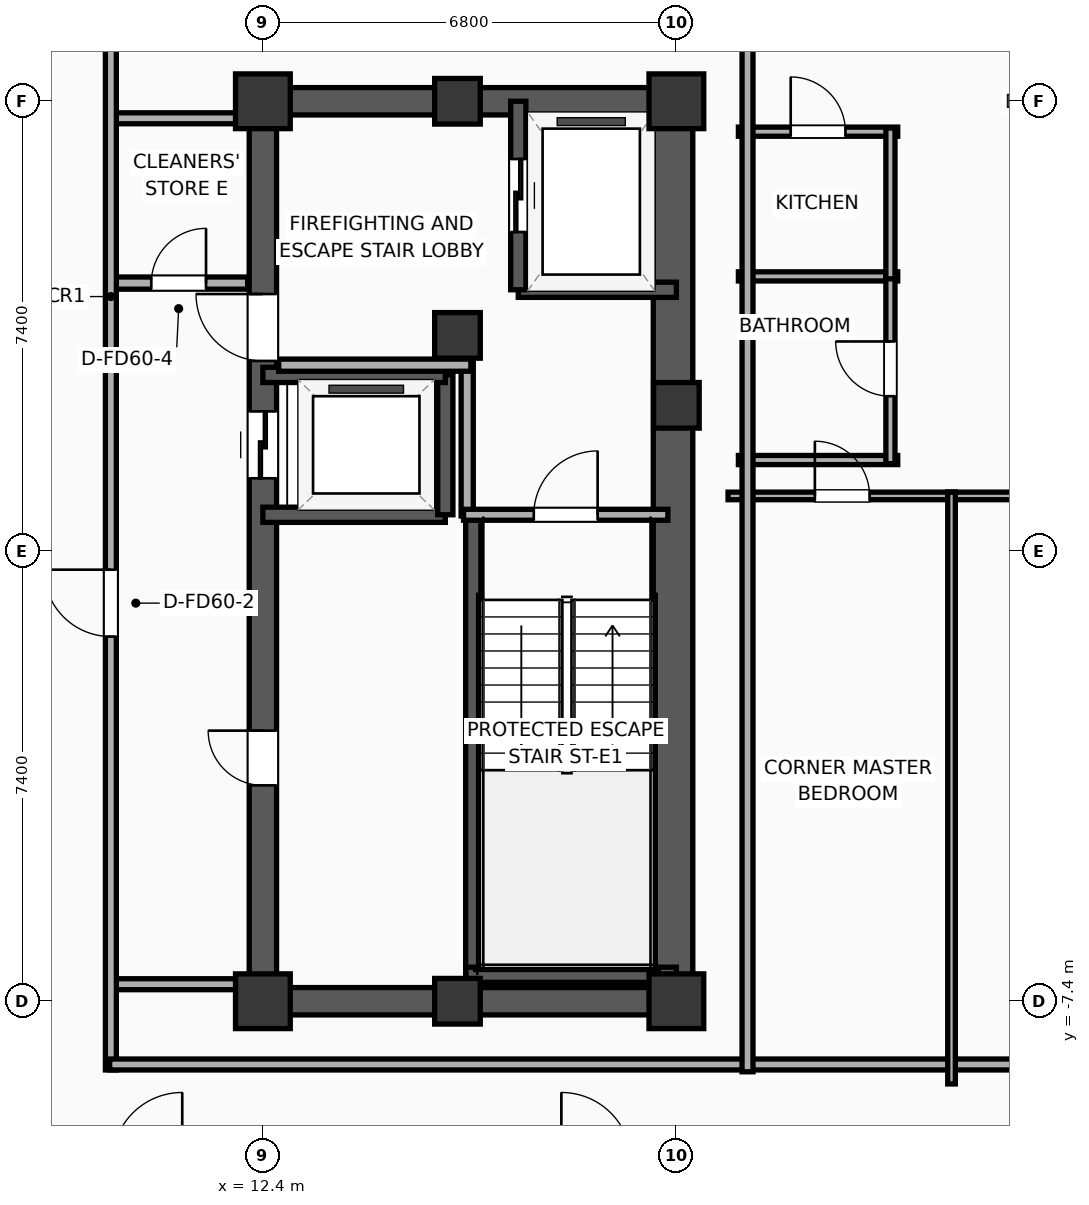
"""IFC4 building model, lengths in metres.
Left out: names, types, materials, properties, quantities, classifications, styles, units other than length and angle.
Written with IfcOpenShell. Run it as: python <this file> out.ifc"""

import sys

from ifc_helpers import new_model, si_unit, direction, frame, frame_2d, origin, origin_2d, place, context, subcontext, project, spatial, rectangle, extrude, element, fill, save


model = new_model("IFC4")
c1 = context("Model", 3, precision=1e-05, world=origin(), true_north=direction((0.0, 1.0)))
c2 = subcontext(c1, "Body", "Model", "MODEL_VIEW")
j1 = project(units=[si_unit("LENGTHUNIT", "METRE"), si_unit("PLANEANGLEUNIT", "RADIAN")], contexts=[c1])
p1 = place(None, origin())
s1 = spatial("IfcSite", under=j1, at=p1, CompositionType="ELEMENT")
p2 = place(p1, origin())
s2 = spatial("IfcBuilding", under=s1, at=p2, CompositionType="ELEMENT")
p3 = place(p2, frame((0.0, 0.0, 211.9)))
s3 = spatial("IfcBuildingStorey", under=s2, at=p3, CompositionType="ELEMENT", Elevation=211.9)
p4 = place(p3, frame((12.4, -7.4, 0.0), z_axis=(0.0, 0.0, 1.0), x_axis=(1.0, 0.0, 0.0)))
e1 = element("IfcColumn", 1, at=p4, inside=s3, PredefinedType="COLUMN", context=c2, shape_type="SweptSolid", body=[
    extrude(rectangle(XDim=0.9, YDim=0.9, at=origin_2d()), origin(), (0.0, 0.0, 1.0), 3.9),
])
p5 = place(p3, frame((15.6, 3.55, 0.0), z_axis=(0.0, 0.0, 1.0), x_axis=(1.0, 0.0, 0.0)))
e2 = element("IfcColumn", 2, at=p5, inside=s3, PredefinedType="COLUMN", context=c2, shape_type="SweptSolid", body=[
    extrude(rectangle(XDim=0.75, YDim=0.75, at=origin_2d()), origin(), (0.0, 0.0, 1.0), 3.9),
])
p6 = place(p3, frame((12.4, 7.4, 0.0), z_axis=(0.0, 0.0, 1.0), x_axis=(1.0, 0.0, 0.0)))
e3 = element("IfcColumn", 3, at=p6, inside=s3, PredefinedType="COLUMN", context=c2, shape_type="SweptSolid", body=[
    extrude(rectangle(XDim=0.9, YDim=0.9, at=origin_2d()), origin(), (0.0, 0.0, 1.0), 3.9),
])
for number, where, z_axis, x_axis in (
    (4, (15.6, -7.4, 0.0), (0.0, 0.0, 1.0), (1.0, 0.0, 0.0)),
    (5, (15.6, 7.4, 0.0), (0.0, 0.0, 1.0), (1.0, 0.0, 0.0)),
):
    element("IfcColumn", number, at=place(p3, frame(where, z_axis=z_axis, x_axis=x_axis)), inside=s3, PredefinedType="COLUMN", context=c2, shape_type="SweptSolid", body=[
        extrude(rectangle(XDim=0.75, YDim=0.75, at=origin_2d()), origin(), (0.0, 0.0, 1.0), 3.9),
    ])
p7 = place(p3, frame((19.2, -7.4, 0.0), z_axis=(0.0, 0.0, 1.0), x_axis=(1.0, 0.0, 0.0)))
e6 = element("IfcColumn", 6, at=p7, inside=s3, PredefinedType="COLUMN", context=c2, shape_type="SweptSolid", body=[
    extrude(rectangle(XDim=0.9, YDim=0.9, at=origin_2d()), origin(), (0.0, 0.0, 1.0), 3.9),
])
p8 = place(p3, frame((19.2, 2.4, 0.0), z_axis=(0.0, 0.0, 1.0), x_axis=(1.0, 0.0, 0.0)))
e7 = element("IfcColumn", 7, at=p8, inside=s3, PredefinedType="COLUMN", context=c2, shape_type="SweptSolid", body=[
    extrude(rectangle(XDim=0.75, YDim=0.75, at=origin_2d()), origin(), (0.0, 0.0, 1.0), 3.9),
])
p9 = place(p3, frame((19.2, 7.4, 0.0), z_axis=(0.0, 0.0, 1.0), x_axis=(1.0, 0.0, 0.0)))
e8 = element("IfcColumn", 8, at=p9, inside=s3, PredefinedType="COLUMN", context=c2, shape_type="SweptSolid", body=[
    extrude(rectangle(XDim=0.9, YDim=0.9, at=origin_2d()), origin(), (0.0, 0.0, 1.0), 3.9),
])
for number, where, z_axis, x_axis in (
    (9, (12.175, -7.4, 0.0), (0.0, 0.0, 1.0), (1.0, 0.0, 0.0)),
    (10, (12.175, 7.4, 0.0), (0.0, 0.0, 1.0), (1.0, 0.0, 0.0)),
):
    element("IfcWall", number, at=place(p3, frame(where, z_axis=z_axis, x_axis=x_axis)), inside=s3, PredefinedType="SHEAR", context=c2, shape_type="SweptSolid", body=[
        extrude(rectangle(XDim=7.25, YDim=0.45, at=frame_2d((3.625, 0.0))), origin(), (0.0, 0.0, 1.0), 3.65),
    ])
p10 = place(p3, frame((12.4, -7.4, 0.0), z_axis=(0.0, 0.0, 1.0), x_axis=(0.0, 1.0, 0.0)))
e11 = element("IfcWall", 11, at=p10, inside=s3, PredefinedType="SHEAR", context=c2, shape_type="SweptSolid", body=[
    extrude(rectangle(XDim=14.8, YDim=0.45, at=frame_2d((7.4, 0.0))), origin(), (0.0, 0.0, 1.0), 3.65),
])
p11 = place(p10, frame((8.6, 0.0, 0.0)))
e12 = element("IfcOpeningElement", 12, at=p11, cuts=e11, PredefinedType="OPENING", context=c2, shape_type="SweptSolid", body=[
    extrude(rectangle(XDim=1.1, YDim=2.05, at=frame_2d((0.55, 1.025))), frame((0.0, 0.235, 0.0), z_axis=(0.0, -1.0, 0.0), x_axis=(1.0, 0.0, 0.0)), (0.0, 0.0, 1.0), 0.47),
])
p12 = place(p10, frame((10.53, 0.0, 0.0)))
e13 = element("IfcOpeningElement", 13, at=p12, cuts=e11, PredefinedType="OPENING", context=c2, shape_type="SweptSolid", body=[
    extrude(rectangle(XDim=1.1, YDim=2.05, at=frame_2d((0.55, 1.025))), frame((0.0, 0.235, 0.0), z_axis=(0.0, -1.0, 0.0), x_axis=(1.0, 0.0, 0.0)), (0.0, 0.0, 1.0), 0.47),
])
p13 = place(p10, frame((3.55, 0.0, 0.0)))
e14 = element("IfcOpeningElement", 14, at=p13, cuts=e11, PredefinedType="OPENING", context=c2, shape_type="SweptSolid", body=[
    extrude(rectangle(XDim=0.9, YDim=2.05, at=frame_2d((0.45, 1.025))), frame((0.0, 0.235, 0.0), z_axis=(0.0, -1.0, 0.0), x_axis=(1.0, 0.0, 0.0)), (0.0, 0.0, 1.0), 0.47),
])
p14 = place(p3, frame((19.145, -7.4, 0.0), z_axis=(0.0, 0.0, 1.0), x_axis=(0.0, 1.0, 0.0)))
e15 = element("IfcWall", 15, at=p14, inside=s3, PredefinedType="SHEAR", context=c2, shape_type="SweptSolid", body=[
    extrude(rectangle(XDim=14.8, YDim=0.65, at=frame_2d((7.4, 0.0))), origin(), (0.0, 0.0, 1.0), 3.65),
])
p15 = place(p3, frame((15.86, -7.085, 0.0), z_axis=(0.0, 0.0, 1.0), x_axis=(0.0, 1.0, 0.0)))
e16 = element("IfcWall", 16, at=p15, inside=s3, PredefinedType="SOLIDWALL", context=c2, shape_type="SweptSolid", body=[
    extrude(rectangle(XDim=7.685, YDim=0.25, at=frame_2d((3.843, 0.0))), origin(), (0.0, 0.0, 1.0), 3.65),
])
p16 = place(p3, frame((15.74, -6.965, 0.0), z_axis=(0.0, 0.0, 1.0), x_axis=(1.0, 0.0, 0.0)))
e17 = element("IfcWall", 17, at=p16, inside=s3, PredefinedType="SOLIDWALL", context=c2, shape_type="SweptSolid", body=[
    extrude(rectangle(XDim=3.46, YDim=0.25, at=frame_2d((1.73, 0.0))), origin(), (0.0, 0.0, 1.0), 3.65),
])
p17 = place(p3, frame((16.6, 4.3, 0.0), z_axis=(0.0, 0.0, 1.0), x_axis=(1.0, 0.0, 0.0)))
e18 = element("IfcWall", 18, at=p17, inside=s3, PredefinedType="SOLIDWALL", context=c2, shape_type="SweptSolid", body=[
    extrude(rectangle(XDim=2.6, YDim=0.25, at=frame_2d((1.3, 0.0))), origin(), (0.0, 0.0, 1.0), 3.65),
])
p18 = place(p3, frame((16.6, 7.4, 0.0), z_axis=(0.0, 0.0, 1.0), x_axis=(0.0, -1.0, 0.0)))
e19 = element("IfcWall", 19, at=p18, inside=s3, PredefinedType="SOLIDWALL", context=c2, shape_type="SweptSolid", body=[
    extrude(rectangle(XDim=3.1, YDim=0.25, at=frame_2d((1.55, 0.0))), origin(), (0.0, 0.0, 1.0), 3.65),
])
p19 = place(p18, frame((0.95, 0.0, 0.0)))
e20 = element("IfcOpeningElement", 20, at=p19, cuts=e19, PredefinedType="OPENING", context=c2, shape_type="SweptSolid", body=[
    extrude(rectangle(XDim=1.2, YDim=2.05, at=frame_2d((0.6, 1.025))), frame((0.0, 0.135, 0.0), z_axis=(0.0, -1.0, 0.0), x_axis=(1.0, 0.0, 0.0)), (0.0, 0.0, 1.0), 0.27),
])
p20 = place(p3, frame((12.4, 0.6, 0.0), z_axis=(0.0, 0.0, 1.0), x_axis=(1.0, 0.0, 0.0)))
e21 = element("IfcWall", 21, at=p20, inside=s3, PredefinedType="SOLIDWALL", context=c2, shape_type="SweptSolid", body=[
    extrude(rectangle(XDim=3.0, YDim=0.25, at=frame_2d((1.5, 0.0))), origin(), (0.0, 0.0, 1.0), 3.65),
])
p21 = place(p3, frame((15.4, 0.6, 0.0), z_axis=(0.0, 0.0, 1.0), x_axis=(0.0, 1.0, 0.0)))
e22 = element("IfcWall", 22, at=p21, inside=s3, PredefinedType="SOLIDWALL", context=c2, shape_type="SweptSolid", body=[
    extrude(rectangle(XDim=2.3, YDim=0.25, at=frame_2d((1.15, 0.0))), origin(), (0.0, 0.0, 1.0), 3.65),
])
p22 = place(p3, frame((15.4, 2.9, 0.0), z_axis=(0.0, 0.0, 1.0), x_axis=(-1.0, 0.0, 0.0)))
e23 = element("IfcWall", 23, at=p22, inside=s3, PredefinedType="SOLIDWALL", context=c2, shape_type="SweptSolid", body=[
    extrude(rectangle(XDim=3.0, YDim=0.25, at=frame_2d((1.5, 0.0))), origin(), (0.0, 0.0, 1.0), 3.65),
])
p23 = place(p3, frame((15.76, 0.58, 0.0), z_axis=(0.0, 0.0, 1.0), x_axis=(0.0, 1.0, 0.0)))
e24 = element("IfcWall", 24, at=p23, inside=s3, PredefinedType="PARTITIONING", context=c2, shape_type="SweptSolid", body=[
    extrude(rectangle(XDim=2.52, YDim=0.2, at=frame_2d((1.26, 0.0))), origin(), (0.0, 0.0, 1.0), 3.65),
])
p24 = place(p3, frame((12.66, 3.06, 0.0), z_axis=(0.0, 0.0, 1.0), x_axis=(1.0, 0.0, 0.0)))
e25 = element("IfcWall", 25, at=p24, inside=s3, PredefinedType="PARTITIONING", context=c2, shape_type="SweptSolid", body=[
    extrude(rectangle(XDim=3.16, YDim=0.2, at=frame_2d((1.58, 0.0))), origin(), (0.0, 0.0, 1.0), 3.65),
])
p25 = place(p3, frame((15.7, 0.6, 0.0), z_axis=(0.0, 0.0, 1.0), x_axis=(1.0, 0.0, 0.0)))
e26 = element("IfcWall", 26, at=p25, inside=s3, PredefinedType="PARTITIONING", context=c2, shape_type="SweptSolid", body=[
    extrude(rectangle(XDim=3.36, YDim=0.18, at=frame_2d((1.68, 0.0))), origin(), (0.0, 0.0, 1.0), 3.65),
])
p26 = place(p25, frame((1.155, 0.0, 0.0)))
e27 = element("IfcOpeningElement", 27, at=p26, cuts=e26, PredefinedType="OPENING", context=c2, shape_type="SweptSolid", body=[
    extrude(rectangle(XDim=1.05, YDim=2.05, at=frame_2d((0.525, 1.025))), frame((0.0, 0.1, 0.0), z_axis=(0.0, -1.0, 0.0), x_axis=(1.0, 0.0, 0.0)), (0.0, 0.0, 1.0), 0.2),
])
p27 = place(p3, frame((9.88, 4.41, 0.0), z_axis=(0.0, 0.0, 1.0), x_axis=(1.0, 0.0, 0.0)))
e28 = element("IfcWall", 28, at=p27, inside=s3, PredefinedType="PARTITIONING", context=c2, shape_type="SweptSolid", body=[
    extrude(rectangle(XDim=2.27, YDim=0.2, at=frame_2d((1.135, 0.0))), origin(), (0.0, 0.0, 1.0), 3.65),
])
p28 = place(p27, frame((0.685, 0.0, 0.0)))
e29 = element("IfcOpeningElement", 29, at=p28, cuts=e28, PredefinedType="OPENING", context=c2, shape_type="SweptSolid", body=[
    extrude(rectangle(XDim=0.9, YDim=2.05, at=frame_2d((0.45, 1.025))), frame((0.0, 0.11, 0.0), z_axis=(0.0, -1.0, 0.0), x_axis=(1.0, 0.0, 0.0)), (0.0, 0.0, 1.0), 0.22),
])
for number, where, z_axis, x_axis in (
    (30, (9.88, 7.12, 0.0), (0.0, 0.0, 1.0), (1.0, 0.0, 0.0)),
    (31, (9.88, -7.12, 0.0), (0.0, 0.0, 1.0), (1.0, 0.0, 0.0)),
):
    element("IfcWall", number, at=place(p3, frame(where, z_axis=z_axis, x_axis=x_axis)), inside=s3, PredefinedType="PARTITIONING", context=c2, shape_type="SweptSolid", body=[
        extrude(rectangle(XDim=2.27, YDim=0.18, at=frame_2d((1.135, 0.0))), origin(), (0.0, 0.0, 1.0), 3.65),
    ])
p29 = place(p3, frame((9.9, -8.53, 0.0), z_axis=(0.0, 0.0, 1.0), x_axis=(0.0, 1.0, 0.0)))
e32 = element("IfcWall", 32, at=p29, inside=s3, PredefinedType="PARTITIONING", context=c2, shape_type="SweptSolid", body=[
    extrude(rectangle(XDim=17.06, YDim=0.18, at=frame_2d((8.53, 0.0))), origin(), (0.0, 0.0, 1.0), 3.65),
])
p30 = place(p29, frame((7.127, 0.0, 0.0)))
e33 = element("IfcOpeningElement", 33, at=p30, cuts=e32, PredefinedType="OPENING", context=c2, shape_type="SweptSolid", body=[
    extrude(rectangle(XDim=1.1, YDim=2.05, at=frame_2d((0.55, 1.025))), frame((0.0, 0.1, 0.0), z_axis=(0.0, -1.0, 0.0), x_axis=(1.0, 0.0, 0.0)), (0.0, 0.0, 1.0), 0.2),
])
p31 = place(p3, frame((9.88, -8.44, 0.0), z_axis=(0.0, 0.0, 1.0), x_axis=(1.0, 0.0, 0.0)))
e34 = element("IfcWall", 34, at=p31, inside=s3, PredefinedType="PARTITIONING", context=c2, shape_type="SweptSolid", body=[
    extrude(rectangle(XDim=20.35, YDim=0.18, at=frame_2d((10.175, 0.0))), origin(), (0.0, 0.0, 1.0), 3.65),
])
p32 = place(p3, frame((20.22, 6.9, 0.0), z_axis=(0.0, 0.0, 1.0), x_axis=(1.0, 0.0, 0.0)))
e35 = element("IfcWall", 35, at=p32, inside=s3, PredefinedType="PLUMBINGWALL", context=c2, shape_type="SweptSolid", body=[
    extrude(rectangle(XDim=2.62, YDim=0.15, at=frame_2d((1.31, 0.0))), origin(), (0.0, 0.0, 1.0), 3.65),
])
p33 = place(p32, frame((0.86, 0.0, 0.0)))
e36 = element("IfcOpeningElement", 36, at=p33, cuts=e35, PredefinedType="OPENING", context=c2, shape_type="SweptSolid", body=[
    extrude(rectangle(XDim=0.9, YDim=2.05, at=frame_2d((0.45, 1.025))), frame((0.0, 0.085, 0.0), z_axis=(0.0, -1.0, 0.0), x_axis=(1.0, 0.0, 0.0)), (0.0, 0.0, 1.0), 0.17),
])
for number, where, z_axis, x_axis in (
    (37, (20.22, 4.52, 0.0), (0.0, 0.0, 1.0), (1.0, 0.0, 0.0)),
    (38, (20.22, 1.5, 0.0), (0.0, 0.0, 1.0), (1.0, 0.0, 0.0)),
):
    element("IfcWall", number, at=place(p3, frame(where, z_axis=z_axis, x_axis=x_axis)), inside=s3, PredefinedType="PLUMBINGWALL", context=c2, shape_type="SweptSolid", body=[
        extrude(rectangle(XDim=2.62, YDim=0.15, at=frame_2d((1.31, 0.0))), origin(), (0.0, 0.0, 1.0), 3.65),
    ])
p34 = place(p3, frame((22.72, 1.44, 0.0), z_axis=(0.0, 0.0, 1.0), x_axis=(0.0, 1.0, 0.0)))
e39 = element("IfcWall", 39, at=p34, inside=s3, PredefinedType="PLUMBINGWALL", context=c2, shape_type="SweptSolid", body=[
    extrude(rectangle(XDim=3.12, YDim=0.15, at=frame_2d((1.56, 0.0))), origin(), (0.0, 0.0, 1.0), 3.65),
])
p35 = place(p34, frame((1.11, 0.0, 0.0)))
e40 = element("IfcOpeningElement", 40, at=p35, cuts=e39, PredefinedType="OPENING", context=c2, shape_type="SweptSolid", body=[
    extrude(rectangle(XDim=0.9, YDim=2.05, at=frame_2d((0.45, 1.025))), frame((0.0, 0.085, 0.0), z_axis=(0.0, -1.0, 0.0), x_axis=(1.0, 0.0, 0.0)), (0.0, 0.0, 1.0), 0.17),
])
p36 = place(p3, frame((22.72, 4.48, 0.0), z_axis=(0.0, 0.0, 1.0), x_axis=(0.0, 1.0, 0.0)))
e41 = element("IfcWall", 41, at=p36, inside=s3, PredefinedType="PLUMBINGWALL", context=c2, shape_type="SweptSolid", body=[
    extrude(rectangle(XDim=2.48, YDim=0.15, at=frame_2d((1.24, 0.0))), origin(), (0.0, 0.0, 1.0), 3.65),
])
p37 = place(p3, frame((20.05, 0.91, 0.0), z_axis=(0.0, 0.0, 1.0), x_axis=(1.0, 0.0, 0.0)))
e42 = element("IfcWall", 42, at=p37, inside=s3, PredefinedType="PARTITIONING", context=c2, shape_type="SweptSolid", body=[
    extrude(rectangle(XDim=3.738, YDim=0.125, at=frame_2d((1.869, 0.0))), origin(), (0.0, 0.0, 1.0), 3.65),
])
p38 = place(p37, frame((1.427, 0.0, 0.0)))
e43 = element("IfcOpeningElement", 43, at=p38, cuts=e42, PredefinedType="OPENING", context=c2, shape_type="SweptSolid", body=[
    extrude(rectangle(XDim=0.9, YDim=2.05, at=frame_2d((0.45, 1.025))), frame((0.0, 0.073, 0.0), z_axis=(0.0, -1.0, 0.0), x_axis=(1.0, 0.0, 0.0)), (0.0, 0.0, 1.0), 0.145),
])
p39 = place(p3, frame((23.663, 0.91, 0.0), z_axis=(0.0, 0.0, 1.0), x_axis=(1.0, 0.0, 0.0)))
e44 = element("IfcWall", 44, at=p39, inside=s3, PredefinedType="PARTITIONING", context=c2, shape_type="SweptSolid", body=[
    extrude(rectangle(XDim=3.381, YDim=0.125, at=frame_2d((1.69, 0.0))), origin(), (0.0, 0.0, 1.0), 3.65),
])
p40 = place(p39, frame((1.24, 0.0, 0.0)))
e45 = element("IfcOpeningElement", 45, at=p40, cuts=e44, PredefinedType="OPENING", context=c2, shape_type="SweptSolid", body=[
    extrude(rectangle(XDim=0.9, YDim=2.05, at=frame_2d((0.45, 1.025))), frame((0.0, 0.073, 0.0), z_axis=(0.0, -1.0, 0.0), x_axis=(1.0, 0.0, 0.0)), (0.0, 0.0, 1.0), 0.145),
])
p41 = place(p3, frame((23.725, -8.76, 0.0), z_axis=(0.0, 0.0, 1.0), x_axis=(0.0, 1.0, 0.0)))
e46 = element("IfcWall", 46, at=p41, inside=s3, PredefinedType="PARTITIONING", context=c2, shape_type="SweptSolid", body=[
    extrude(rectangle(XDim=9.73, YDim=0.125, at=frame_2d((4.865, 0.0))), origin(), (0.0, 0.0, 1.0), 3.65),
])
p42 = place(p3, frame((20.37, -8.56, 0.0), z_axis=(0.0, 0.0, 1.0), x_axis=(0.0, 1.0, 0.0)))
e47 = element("IfcWall", 47, at=p42, inside=s3, PredefinedType="PARTITIONING", context=c2, shape_type="SweptSolid", body=[
    extrude(rectangle(XDim=17.12, YDim=0.18, at=frame_2d((8.56, 0.0))), origin(), (0.0, 0.0, 1.0), 3.65),
])
p43 = place(p19, origin())
e48 = element("IfcDoor", 48, at=p43, inside=s3, OperationType="SLIDING_TO_LEFT", PredefinedType="DOOR", context=c2, shape_type="SweptSolid", body=[
    extrude(rectangle(XDim=1.2, YDim=2.05, at=frame_2d((0.6, 1.025))), frame((0.0, 0.025, 0.0), z_axis=(0.0, -1.0, 0.0), x_axis=(1.0, 0.0, 0.0)), (0.0, 0.0, 1.0), 0.05),
])
fill(e20, e48)
p44 = place(p11, origin())
e49 = element("IfcDoor", 49, at=p44, inside=s3, OperationType="SLIDING_TO_LEFT", PredefinedType="DOOR", context=c2, shape_type="SweptSolid", body=[
    extrude(rectangle(XDim=1.1, YDim=2.05, at=frame_2d((0.55, 1.025))), frame((0.0, 0.025, 0.0), z_axis=(0.0, -1.0, 0.0), x_axis=(1.0, 0.0, 0.0)), (0.0, 0.0, 1.0), 0.05),
])
fill(e12, e49)
p45 = place(p26, origin())
e50 = element("IfcDoor", 50, at=p45, inside=s3, OperationType="SINGLE_SWING_RIGHT", PredefinedType="DOOR", context=c2, shape_type="SweptSolid", body=[
    extrude(rectangle(XDim=1.05, YDim=2.05, at=frame_2d((0.525, 1.025))), frame((0.0, 0.025, 0.0), z_axis=(0.0, -1.0, 0.0), x_axis=(1.0, 0.0, 0.0)), (0.0, 0.0, 1.0), 0.05),
])
fill(e27, e50)
p46 = place(p28, origin())
e51 = element("IfcDoor", 51, at=p46, inside=s3, OperationType="SINGLE_SWING_RIGHT", PredefinedType="DOOR", context=c2, shape_type="SweptSolid", body=[
    extrude(rectangle(XDim=0.9, YDim=2.05, at=frame_2d((0.45, 1.025))), frame((0.0, 0.025, 0.0), z_axis=(0.0, -1.0, 0.0), x_axis=(1.0, 0.0, 0.0)), (0.0, 0.0, 1.0), 0.05),
])
fill(e29, e51)
p47 = place(p30, origin())
e52 = element("IfcDoor", 52, at=p47, inside=s3, OperationType="SINGLE_SWING_RIGHT", PredefinedType="DOOR", context=c2, shape_type="SweptSolid", body=[
    extrude(rectangle(XDim=1.1, YDim=2.05, at=frame_2d((0.55, 1.025))), frame((0.0, 0.025, 0.0), z_axis=(0.0, -1.0, 0.0), x_axis=(1.0, 0.0, 0.0)), (0.0, 0.0, 1.0), 0.05),
])
fill(e33, e52)
p48 = place(p33, origin())
e53 = element("IfcDoor", 53, at=p48, inside=s3, OperationType="SINGLE_SWING_LEFT", PredefinedType="DOOR", context=c2, shape_type="SweptSolid", body=[
    extrude(rectangle(XDim=0.9, YDim=2.05, at=frame_2d((0.45, 1.025))), frame((0.0, 0.025, 0.0), z_axis=(0.0, -1.0, 0.0), x_axis=(1.0, 0.0, 0.0)), (0.0, 0.0, 1.0), 0.05),
])
fill(e36, e53)
p49 = place(p35, origin())
e54 = element("IfcDoor", 54, at=p49, inside=s3, OperationType="SINGLE_SWING_RIGHT", PredefinedType="DOOR", context=c2, shape_type="SweptSolid", body=[
    extrude(rectangle(XDim=0.9, YDim=2.05, at=frame_2d((0.45, 1.025))), frame((0.0, 0.025, 0.0), z_axis=(0.0, -1.0, 0.0), x_axis=(1.0, 0.0, 0.0)), (0.0, 0.0, 1.0), 0.05),
])
fill(e40, e54)
p50 = place(p38, origin())
e55 = element("IfcDoor", 55, at=p50, inside=s3, OperationType="SINGLE_SWING_LEFT", PredefinedType="DOOR", context=c2, shape_type="SweptSolid", body=[
    extrude(rectangle(XDim=0.9, YDim=2.05, at=frame_2d((0.45, 1.025))), frame((0.0, 0.025, 0.0), z_axis=(0.0, -1.0, 0.0), x_axis=(1.0, 0.0, 0.0)), (0.0, 0.0, 1.0), 0.05),
])
fill(e43, e55)
p51 = place(p12, origin())
e56 = element("IfcDoor", 56, at=p51, inside=s3, OperationType="SINGLE_SWING_RIGHT", PredefinedType="DOOR", context=c2, shape_type="SweptSolid", body=[
    extrude(rectangle(XDim=1.1, YDim=2.05, at=frame_2d((0.55, 1.025))), frame((0.0, 0.025, 0.0), z_axis=(0.0, -1.0, 0.0), x_axis=(1.0, 0.0, 0.0)), (0.0, 0.0, 1.0), 0.05),
])
fill(e13, e56)
p52 = place(p13, origin())
e57 = element("IfcDoor", 57, at=p52, inside=s3, OperationType="SINGLE_SWING_RIGHT", PredefinedType="DOOR", context=c2, shape_type="SweptSolid", body=[
    extrude(rectangle(XDim=0.9, YDim=2.05, at=frame_2d((0.45, 1.025))), frame((0.0, 0.025, 0.0), z_axis=(0.0, -1.0, 0.0), x_axis=(1.0, 0.0, 0.0)), (0.0, 0.0, 1.0), 0.05),
])
fill(e14, e57)
save(model, sys.argv[1])
